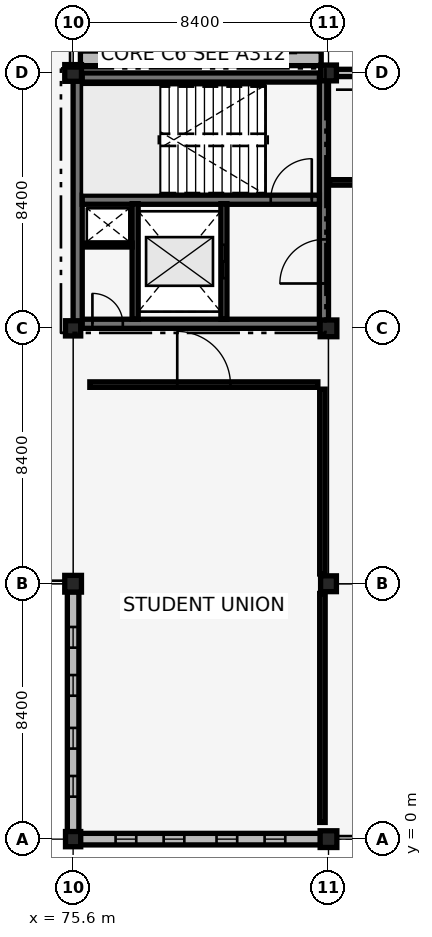
"""IFC4 building model, lengths in metres.
Left out: names, types, materials, properties, quantities, classifications, styles, units other than length and angle.
Written with IfcOpenShell. Run it as: python <this file> out.ifc"""

import sys

from ifc_helpers import new_model, si_unit, direction, frame, frame_2d, origin, origin_2d, place, context, subcontext, project, spatial, rectangle, extrude, element, fill, save


model = new_model("IFC4")
c1 = context("Model", 3, precision=1e-05, world=origin(), true_north=direction((0.0, 1.0)))
c2 = subcontext(c1, "Body", "Model", "MODEL_VIEW")
j1 = project(units=[si_unit("LENGTHUNIT", "METRE"), si_unit("PLANEANGLEUNIT", "RADIAN")], contexts=[c1])
p1 = place(None, origin())
s1 = spatial("IfcSite", under=j1, at=p1, CompositionType="ELEMENT")
p2 = place(p1, origin())
s2 = spatial("IfcBuilding", under=s1, at=p2, CompositionType="ELEMENT")
p3 = place(p2, frame((0.0, 0.0, 5.44)))
s3 = spatial("IfcBuildingStorey", under=s2, at=p3, CompositionType="ELEMENT", Elevation=5.44)
p4 = place(p3, frame((75.75, 16.95, 0.0), z_axis=(0.0, 0.0, 1.0), x_axis=(1.0, 0.0, 0.0)))
e1 = element("IfcWall", 1, at=p4, inside=s3, PredefinedType="SHEAR", context=c2, shape_type="SweptSolid", body=[
    extrude(rectangle(XDim=8.1, YDim=0.3, at=frame_2d((4.05, 0.0))), origin(), (0.0, 0.0, 1.0), 4.12),
])
p5 = place(p4, frame((0.485, 0.0, 0.0)))
e2 = element("IfcOpeningElement", 2, at=p5, cuts=e1, PredefinedType="OPENING", context=c2, shape_type="SweptSolid", body=[
    extrude(rectangle(XDim=1.0, YDim=2.15, at=frame_2d((0.5, 1.075))), frame((0.0, 0.16, 0.0), z_axis=(0.0, -1.0, 0.0), x_axis=(1.0, 0.0, 0.0)), (0.0, 0.0, 1.0), 0.32),
])
for number, where, z_axis, x_axis in (
    (3, (75.75, 25.05, 0.0), (0.0, 0.0, 1.0), (1.0, 0.0, 0.0)),
    (4, (75.75, 16.95, 0.0), (0.0, 0.0, 1.0), (0.0, 1.0, 0.0)),
):
    element("IfcWall", number, at=place(p3, frame(where, z_axis=z_axis, x_axis=x_axis)), inside=s3, PredefinedType="SHEAR", context=c2, shape_type="SweptSolid", body=[
        extrude(rectangle(XDim=8.1, YDim=0.3, at=frame_2d((4.05, 0.0))), origin(), (0.0, 0.0, 1.0), 4.12),
    ])
p6 = place(p3, frame((83.85, 16.95, 0.0), z_axis=(0.0, 0.0, 1.0), x_axis=(0.0, 1.0, 0.0)))
e5 = element("IfcWall", 5, at=p6, inside=s3, PredefinedType="SHEAR", context=c2, shape_type="SweptSolid", body=[
    extrude(rectangle(XDim=8.1, YDim=0.3, at=frame_2d((4.05, 0.0))), origin(), (0.0, 0.0, 1.0), 4.12),
])
p7 = place(p6, frame((1.325, 0.0, 0.0)))
e6 = element("IfcOpeningElement", 6, at=p7, cuts=e5, PredefinedType="OPENING", context=c2, shape_type="SweptSolid", body=[
    extrude(rectangle(XDim=1.45, YDim=2.15, at=frame_2d((0.725, 1.075))), frame((0.0, 0.16, 0.0), z_axis=(0.0, -1.0, 0.0), x_axis=(1.0, 0.0, 0.0)), (0.0, 0.0, 1.0), 0.32),
])
p8 = place(p3, frame((75.9, 21.03, 0.0), z_axis=(0.0, 0.0, 1.0), x_axis=(1.0, 0.0, 0.0)))
e7 = element("IfcWall", 7, at=p8, inside=s3, PredefinedType="SHEAR", context=c2, shape_type="SweptSolid", body=[
    extrude(rectangle(XDim=7.8, YDim=0.3, at=frame_2d((3.9, 0.0))), origin(), (0.0, 0.0, 1.0), 4.12),
])
p9 = place(p8, frame((6.2, 0.0, 0.0)))
e8 = element("IfcOpeningElement", 8, at=p9, cuts=e7, PredefinedType="OPENING", context=c2, shape_type="SweptSolid", body=[
    extrude(rectangle(XDim=1.35, YDim=2.15, at=frame_2d((0.675, 1.075))), frame((0.0, 0.16, 0.0), z_axis=(0.0, -1.0, 0.0), x_axis=(1.0, 0.0, 0.0)), (0.0, 0.0, 1.0), 0.32),
])
p10 = place(p3, frame((75.6, 0.0, 0.0), z_axis=(0.0, 0.0, 1.0), x_axis=(1.0, 0.0, 0.0)))
e9 = element("IfcColumn", 9, at=p10, inside=s3, PredefinedType="COLUMN", context=c2, shape_type="SweptSolid", body=[
    extrude(rectangle(XDim=0.5, YDim=0.5, at=origin_2d()), origin(), (0.0, 0.0, 1.0), 4.12),
])
p11 = place(p3, frame((75.6, 8.4, 0.0), z_axis=(0.0, 0.0, 1.0), x_axis=(1.0, 0.0, 0.0)))
e10 = element("IfcColumn", 10, at=p11, inside=s3, PredefinedType="COLUMN", context=c2, shape_type="SweptSolid", body=[
    extrude(rectangle(XDim=0.55, YDim=0.55, at=origin_2d()), origin(), (0.0, 0.0, 1.0), 4.12),
])
p12 = place(p3, frame((75.6, 16.8, 0.0), z_axis=(0.0, 0.0, 1.0), x_axis=(1.0, 0.0, 0.0)))
e11 = element("IfcColumn", 11, at=p12, inside=s3, PredefinedType="COLUMN", context=c2, shape_type="SweptSolid", body=[
    extrude(rectangle(XDim=0.5, YDim=0.5, at=origin_2d()), origin(), (0.0, 0.0, 1.0), 4.12),
])
for number, where, z_axis, x_axis in (
    (12, (75.6, 25.2, 0.0), (0.0, 0.0, 1.0), (1.0, 0.0, 0.0)),
    (13, (84.0, 0.0, 0.0), (0.0, 0.0, 1.0), (1.0, 0.0, 0.0)),
):
    element("IfcColumn", number, at=place(p3, frame(where, z_axis=z_axis, x_axis=x_axis)), inside=s3, PredefinedType="COLUMN", context=c2, shape_type="SweptSolid", body=[
        extrude(rectangle(XDim=0.55, YDim=0.55, at=origin_2d()), origin(), (0.0, 0.0, 1.0), 4.12),
    ])
p13 = place(p3, frame((84.0, 8.4, 0.0), z_axis=(0.0, 0.0, 1.0), x_axis=(1.0, 0.0, 0.0)))
e14 = element("IfcColumn", 14, at=p13, inside=s3, PredefinedType="COLUMN", context=c2, shape_type="SweptSolid", body=[
    extrude(rectangle(XDim=0.52, YDim=0.52, at=origin_2d()), origin(), (0.0, 0.0, 1.0), 4.12),
])
p14 = place(p3, frame((84.0, 16.8, 0.0), z_axis=(0.0, 0.0, 1.0), x_axis=(1.0, 0.0, 0.0)))
e15 = element("IfcColumn", 15, at=p14, inside=s3, PredefinedType="COLUMN", context=c2, shape_type="SweptSolid", body=[
    extrude(rectangle(XDim=0.55, YDim=0.55, at=origin_2d()), origin(), (0.0, 0.0, 1.0), 4.12),
])
p15 = place(p3, frame((84.0, 25.2, 0.0), z_axis=(0.0, 0.0, 1.0), x_axis=(1.0, 0.0, 0.0)))
e16 = element("IfcColumn", 16, at=p15, inside=s3, PredefinedType="COLUMN", context=c2, shape_type="SweptSolid", body=[
    extrude(rectangle(XDim=0.52, YDim=0.52, at=origin_2d()), origin(), (0.0, 0.0, 1.0), 4.12),
])
p16 = place(p3, frame((75.835, 0.0, 0.0), z_axis=(0.0, 0.0, 1.0), x_axis=(1.0, 0.0, 0.0)))
e17 = element("IfcWall", 17, at=p16, inside=s3, PredefinedType="SOLIDWALL", context=c2, shape_type="SweptSolid", body=[
    extrude(rectangle(XDim=7.905, YDim=0.38, at=frame_2d((3.953, 0.0))), origin(), (0.0, 0.0, 1.0), 3.38),
])
p17 = place(p16, frame((1.162, 0.0, 0.7)))
e18 = element("IfcOpeningElement", 18, at=p17, cuts=e17, PredefinedType="OPENING", context=c2, shape_type="SweptSolid", body=[
    extrude(rectangle(XDim=0.68, YDim=2.3, at=frame_2d((0.34, 1.15))), frame((0.0, 0.2, 0.0), z_axis=(0.0, -1.0, 0.0), x_axis=(1.0, 0.0, 0.0)), (0.0, 0.0, 1.0), 0.4),
])
p18 = place(p16, frame((2.743, 0.0, 0.7)))
e19 = element("IfcOpeningElement", 19, at=p18, cuts=e17, PredefinedType="OPENING", context=c2, shape_type="SweptSolid", body=[
    extrude(rectangle(XDim=0.68, YDim=2.3, at=frame_2d((0.34, 1.15))), frame((0.0, 0.2, 0.0), z_axis=(0.0, -1.0, 0.0), x_axis=(1.0, 0.0, 0.0)), (0.0, 0.0, 1.0), 0.4),
])
p19 = place(p16, frame((4.482, 0.0, 0.7)))
e20 = element("IfcOpeningElement", 20, at=p19, cuts=e17, PredefinedType="OPENING", context=c2, shape_type="SweptSolid", body=[
    extrude(rectangle(XDim=0.68, YDim=2.3, at=frame_2d((0.34, 1.15))), frame((0.0, 0.2, 0.0), z_axis=(0.0, -1.0, 0.0), x_axis=(1.0, 0.0, 0.0)), (0.0, 0.0, 1.0), 0.4),
])
p20 = place(p16, frame((6.063, 0.0, 0.7)))
e21 = element("IfcOpeningElement", 21, at=p20, cuts=e17, PredefinedType="OPENING", context=c2, shape_type="SweptSolid", body=[
    extrude(rectangle(XDim=0.68, YDim=2.3, at=frame_2d((0.34, 1.15))), frame((0.0, 0.2, 0.0), z_axis=(0.0, -1.0, 0.0), x_axis=(1.0, 0.0, 0.0)), (0.0, 0.0, 1.0), 0.4),
])
p21 = place(p3, frame((75.6, 0.235, 0.0), z_axis=(0.0, 0.0, 1.0), x_axis=(0.0, 1.0, 0.0)))
e22 = element("IfcWall", 22, at=p21, inside=s3, PredefinedType="SOLIDWALL", context=c2, shape_type="SweptSolid", body=[
    extrude(rectangle(XDim=7.905, YDim=0.38, at=frame_2d((3.952, 0.0))), origin(), (0.0, 0.0, 1.0), 3.81),
])
p22 = place(p21, frame((1.162, 0.0, 0.75)))
e23 = element("IfcOpeningElement", 23, at=p22, cuts=e22, PredefinedType="OPENING", context=c2, shape_type="SweptSolid", body=[
    extrude(rectangle(XDim=0.68, YDim=2.3, at=frame_2d((0.34, 1.15))), frame((0.0, 0.2, 0.0), z_axis=(0.0, -1.0, 0.0), x_axis=(1.0, 0.0, 0.0)), (0.0, 0.0, 1.0), 0.4),
])
p23 = place(p21, frame((2.743, 0.0, 0.75)))
e24 = element("IfcOpeningElement", 24, at=p23, cuts=e22, PredefinedType="OPENING", context=c2, shape_type="SweptSolid", body=[
    extrude(rectangle(XDim=0.68, YDim=2.3, at=frame_2d((0.34, 1.15))), frame((0.0, 0.2, 0.0), z_axis=(0.0, -1.0, 0.0), x_axis=(1.0, 0.0, 0.0)), (0.0, 0.0, 1.0), 0.4),
])
p24 = place(p21, frame((4.482, 0.0, 0.75)))
e25 = element("IfcOpeningElement", 25, at=p24, cuts=e22, PredefinedType="OPENING", context=c2, shape_type="SweptSolid", body=[
    extrude(rectangle(XDim=0.68, YDim=2.3, at=frame_2d((0.34, 1.15))), frame((0.0, 0.2, 0.0), z_axis=(0.0, -1.0, 0.0), x_axis=(1.0, 0.0, 0.0)), (0.0, 0.0, 1.0), 0.4),
])
p25 = place(p21, frame((6.063, 0.0, 0.75)))
e26 = element("IfcOpeningElement", 26, at=p25, cuts=e22, PredefinedType="OPENING", context=c2, shape_type="SweptSolid", body=[
    extrude(rectangle(XDim=0.68, YDim=2.3, at=frame_2d((0.34, 1.15))), frame((0.0, 0.2, 0.0), z_axis=(0.0, -1.0, 0.0), x_axis=(1.0, 0.0, 0.0)), (0.0, 0.0, 1.0), 0.4),
])
p26 = place(p3, frame((75.84, 25.68, 0.0), z_axis=(0.0, 0.0, 1.0), x_axis=(1.0, 0.0, 0.0)))
e27 = element("IfcWall", 27, at=p26, inside=s3, PredefinedType="SOLIDWALL", context=c2, shape_type="SweptSolid", body=[
    extrude(rectangle(XDim=7.92, YDim=0.48, at=frame_2d((3.96, 0.0))), origin(), (0.0, 0.0, 1.0), 4.42),
])
p27 = place(p3, frame((84.245, 25.2, 0.0), z_axis=(0.0, 0.0, 1.0), x_axis=(1.0, 0.0, 0.0)))
e28 = element("IfcWall", 28, at=p27, inside=s3, PredefinedType="SOLIDWALL", context=c2, shape_type="SweptSolid", body=[
    extrude(rectangle(XDim=7.895, YDim=0.24, at=frame_2d((3.947, 0.0))), origin(), (0.0, 0.0, 1.0), 3.37),
])
p28 = place(p27, frame((0.81, 0.0, 0.35)))
e29 = element("IfcOpeningElement", 29, at=p28, cuts=e28, PredefinedType="OPENING", context=c2, shape_type="SweptSolid", body=[
    extrude(rectangle(XDim=0.44, YDim=1.25, at=frame_2d((0.22, 0.625))), frame((0.0, 0.13, 0.0), z_axis=(0.0, -1.0, 0.0), x_axis=(1.0, 0.0, 0.0)), (0.0, 0.0, 1.0), 0.26),
])
p29 = place(p27, frame((2.269, 0.0, 0.35)))
e30 = element("IfcOpeningElement", 30, at=p29, cuts=e28, PredefinedType="OPENING", context=c2, shape_type="SweptSolid", body=[
    extrude(rectangle(XDim=0.44, YDim=1.25, at=frame_2d((0.22, 0.625))), frame((0.0, 0.13, 0.0), z_axis=(0.0, -1.0, 0.0), x_axis=(1.0, 0.0, 0.0)), (0.0, 0.0, 1.0), 0.26),
])
p30 = place(p27, frame((3.728, 0.0, 0.35)))
e31 = element("IfcOpeningElement", 31, at=p30, cuts=e28, PredefinedType="OPENING", context=c2, shape_type="SweptSolid", body=[
    extrude(rectangle(XDim=0.44, YDim=1.25, at=frame_2d((0.22, 0.625))), frame((0.0, 0.13, 0.0), z_axis=(0.0, -1.0, 0.0), x_axis=(1.0, 0.0, 0.0)), (0.0, 0.0, 1.0), 0.26),
])
p31 = place(p27, frame((5.187, 0.0, 0.35)))
e32 = element("IfcOpeningElement", 32, at=p31, cuts=e28, PredefinedType="OPENING", context=c2, shape_type="SweptSolid", body=[
    extrude(rectangle(XDim=0.44, YDim=1.25, at=frame_2d((0.22, 0.625))), frame((0.0, 0.13, 0.0), z_axis=(0.0, -1.0, 0.0), x_axis=(1.0, 0.0, 0.0)), (0.0, 0.0, 1.0), 0.26),
])
p32 = place(p27, frame((6.646, 0.0, 0.35)))
e33 = element("IfcOpeningElement", 33, at=p32, cuts=e28, PredefinedType="OPENING", context=c2, shape_type="SweptSolid", body=[
    extrude(rectangle(XDim=0.44, YDim=1.25, at=frame_2d((0.22, 0.625))), frame((0.0, 0.13, 0.0), z_axis=(0.0, -1.0, 0.0), x_axis=(1.0, 0.0, 0.0)), (0.0, 0.0, 1.0), 0.26),
])
p33 = place(p27, frame((0.81, 0.0, 1.8)))
e34 = element("IfcOpeningElement", 34, at=p33, cuts=e28, PredefinedType="OPENING", context=c2, shape_type="SweptSolid", body=[
    extrude(rectangle(XDim=0.44, YDim=1.25, at=frame_2d((0.22, 0.625))), frame((0.0, 0.13, 0.0), z_axis=(0.0, -1.0, 0.0), x_axis=(1.0, 0.0, 0.0)), (0.0, 0.0, 1.0), 0.26),
])
p34 = place(p27, frame((2.269, 0.0, 1.8)))
e35 = element("IfcOpeningElement", 35, at=p34, cuts=e28, PredefinedType="OPENING", context=c2, shape_type="SweptSolid", body=[
    extrude(rectangle(XDim=0.44, YDim=1.25, at=frame_2d((0.22, 0.625))), frame((0.0, 0.13, 0.0), z_axis=(0.0, -1.0, 0.0), x_axis=(1.0, 0.0, 0.0)), (0.0, 0.0, 1.0), 0.26),
])
p35 = place(p27, frame((3.728, 0.0, 1.8)))
e36 = element("IfcOpeningElement", 36, at=p35, cuts=e28, PredefinedType="OPENING", context=c2, shape_type="SweptSolid", body=[
    extrude(rectangle(XDim=0.44, YDim=1.25, at=frame_2d((0.22, 0.625))), frame((0.0, 0.13, 0.0), z_axis=(0.0, -1.0, 0.0), x_axis=(1.0, 0.0, 0.0)), (0.0, 0.0, 1.0), 0.26),
])
p36 = place(p27, frame((5.187, 0.0, 1.8)))
e37 = element("IfcOpeningElement", 37, at=p36, cuts=e28, PredefinedType="OPENING", context=c2, shape_type="SweptSolid", body=[
    extrude(rectangle(XDim=0.44, YDim=1.25, at=frame_2d((0.22, 0.625))), frame((0.0, 0.13, 0.0), z_axis=(0.0, -1.0, 0.0), x_axis=(1.0, 0.0, 0.0)), (0.0, 0.0, 1.0), 0.26),
])
p37 = place(p27, frame((6.646, 0.0, 1.8)))
e38 = element("IfcOpeningElement", 38, at=p37, cuts=e28, PredefinedType="OPENING", context=c2, shape_type="SweptSolid", body=[
    extrude(rectangle(XDim=0.44, YDim=1.25, at=frame_2d((0.22, 0.625))), frame((0.0, 0.13, 0.0), z_axis=(0.0, -1.0, 0.0), x_axis=(1.0, 0.0, 0.0)), (0.0, 0.0, 1.0), 0.26),
])
p38 = place(p3, frame((80.56, 17.1, 0.0), z_axis=(0.0, 0.0, 1.0), x_axis=(0.0, 1.0, 0.0)))
e39 = element("IfcWall", 39, at=p38, inside=s3, PredefinedType="SHEAR", context=c2, shape_type="SweptSolid", body=[
    extrude(rectangle(XDim=3.8, YDim=0.2, at=frame_2d((1.9, 0.0))), origin(), (0.0, 0.0, 1.0), 3.34),
])
p39 = place(p38, frame((1.35, 0.0, 0.0)))
e40 = element("IfcOpeningElement", 40, at=p39, cuts=e39, PredefinedType="OPENING", context=c2, shape_type="SweptSolid", body=[
    extrude(rectangle(XDim=1.1, YDim=2.15, at=frame_2d((0.55, 1.075))), frame((0.0, 0.11, 0.0), z_axis=(0.0, -1.0, 0.0), x_axis=(1.0, 0.0, 0.0)), (0.0, 0.0, 1.0), 0.22),
])
p40 = place(p3, frame((77.64, 17.1, 0.0), z_axis=(0.0, 0.0, 1.0), x_axis=(0.0, 1.0, 0.0)))
e41 = element("IfcWall", 41, at=p40, inside=s3, PredefinedType="SHEAR", context=c2, shape_type="SweptSolid", body=[
    extrude(rectangle(XDim=3.8, YDim=0.2, at=frame_2d((1.9, 0.0))), origin(), (0.0, 0.0, 1.0), 3.34),
])
p41 = place(p3, frame((75.92, 19.54, 0.0), z_axis=(0.0, 0.0, 1.0), x_axis=(1.0, 0.0, 0.0)))
e42 = element("IfcWall", 42, at=p41, inside=s3, PredefinedType="PARTITIONING", context=c2, shape_type="SweptSolid", body=[
    extrude(rectangle(XDim=1.62, YDim=0.13, at=frame_2d((0.81, 0.0))), origin(), (0.0, 0.0, 1.0), 4.12),
])
p42 = place(p3, frame((76.15, 14.95, 0.0), z_axis=(0.0, 0.0, 1.0), x_axis=(1.0, 0.0, 0.0)))
e43 = element("IfcWall", 43, at=p42, inside=s3, PredefinedType="PARTITIONING", context=c2, shape_type="SweptSolid", body=[
    extrude(rectangle(XDim=7.5, YDim=0.18, at=frame_2d((3.75, 0.0))), origin(), (0.0, 0.0, 1.0), 4.12),
])
p43 = place(p42, frame((2.875, 0.0, 0.0)))
e44 = element("IfcOpeningElement", 44, at=p43, cuts=e43, PredefinedType="OPENING", context=c2, shape_type="SweptSolid", body=[
    extrude(rectangle(XDim=1.75, YDim=2.3, at=frame_2d((0.875, 1.15))), frame((0.0, 0.1, 0.0), z_axis=(0.0, -1.0, 0.0), x_axis=(1.0, 0.0, 0.0)), (0.0, 0.0, 1.0), 0.2),
])
p44 = place(p3, frame((83.8, 0.55, 0.0), z_axis=(0.0, 0.0, 1.0), x_axis=(0.0, 1.0, 0.0)))
e45 = element("IfcWall", 45, at=p44, inside=s3, PredefinedType="PARTITIONING", context=c2, shape_type="SweptSolid", body=[
    extrude(rectangle(XDim=7.53, YDim=0.18, at=frame_2d((3.765, 0.0))), origin(), (0.0, 0.0, 1.0), 3.47),
])
p45 = place(p3, frame((83.8, 8.72, 0.0), z_axis=(0.0, 0.0, 1.0), x_axis=(0.0, 1.0, 0.0)))
e46 = element("IfcWall", 46, at=p45, inside=s3, PredefinedType="PARTITIONING", context=c2, shape_type="SweptSolid", body=[
    extrude(rectangle(XDim=6.08, YDim=0.18, at=frame_2d((3.04, 0.0))), origin(), (0.0, 0.0, 1.0), 3.47),
])
p46 = place(p3, frame((84.03, 21.6, 0.0), z_axis=(0.0, 0.0, 1.0), x_axis=(1.0, 0.0, 0.0)))
e47 = element("IfcWall", 47, at=p46, inside=s3, PredefinedType="PARTITIONING", context=c2, shape_type="SweptSolid", body=[
    extrude(rectangle(XDim=20.62, YDim=0.18, at=frame_2d((10.31, 0.0))), origin(), (0.0, 0.0, 1.0), 3.47),
])
p47 = place(p46, frame((9.435, 0.0, 0.0)))
e48 = element("IfcOpeningElement", 48, at=p47, cuts=e47, PredefinedType="OPENING", context=c2, shape_type="SweptSolid", body=[
    extrude(rectangle(XDim=1.75, YDim=2.3, at=frame_2d((0.875, 1.15))), frame((0.0, 0.1, 0.0), z_axis=(0.0, -1.0, 0.0), x_axis=(1.0, 0.0, 0.0)), (0.0, 0.0, 1.0), 0.2),
])
p48 = place(p17, origin())
e49 = element("IfcWindow", 49, at=p48, inside=s3, PartitioningType="DOUBLE_PANEL_VERTICAL", PredefinedType="WINDOW", context=c2, shape_type="SweptSolid", body=[
    extrude(rectangle(XDim=0.68, YDim=2.3, at=frame_2d((0.34, 1.15))), frame((0.0, 0.03, 0.0), z_axis=(0.0, -1.0, 0.0), x_axis=(1.0, 0.0, 0.0)), (0.0, 0.0, 1.0), 0.06),
])
fill(e18, e49)
p49 = place(p18, origin())
e50 = element("IfcWindow", 50, at=p49, inside=s3, PartitioningType="DOUBLE_PANEL_VERTICAL", PredefinedType="WINDOW", context=c2, shape_type="SweptSolid", body=[
    extrude(rectangle(XDim=0.68, YDim=2.3, at=frame_2d((0.34, 1.15))), frame((0.0, 0.03, 0.0), z_axis=(0.0, -1.0, 0.0), x_axis=(1.0, 0.0, 0.0)), (0.0, 0.0, 1.0), 0.06),
])
fill(e19, e50)
p50 = place(p19, origin())
e51 = element("IfcWindow", 51, at=p50, inside=s3, PartitioningType="DOUBLE_PANEL_VERTICAL", PredefinedType="WINDOW", context=c2, shape_type="SweptSolid", body=[
    extrude(rectangle(XDim=0.68, YDim=2.3, at=frame_2d((0.34, 1.15))), frame((0.0, 0.03, 0.0), z_axis=(0.0, -1.0, 0.0), x_axis=(1.0, 0.0, 0.0)), (0.0, 0.0, 1.0), 0.06),
])
fill(e20, e51)
p51 = place(p20, origin())
e52 = element("IfcWindow", 52, at=p51, inside=s3, PartitioningType="DOUBLE_PANEL_VERTICAL", PredefinedType="WINDOW", context=c2, shape_type="SweptSolid", body=[
    extrude(rectangle(XDim=0.68, YDim=2.3, at=frame_2d((0.34, 1.15))), frame((0.0, 0.03, 0.0), z_axis=(0.0, -1.0, 0.0), x_axis=(1.0, 0.0, 0.0)), (0.0, 0.0, 1.0), 0.06),
])
fill(e21, e52)
p52 = place(p22, origin())
e53 = element("IfcWindow", 53, at=p52, inside=s3, PartitioningType="DOUBLE_PANEL_VERTICAL", PredefinedType="WINDOW", context=c2, shape_type="SweptSolid", body=[
    extrude(rectangle(XDim=0.68, YDim=2.3, at=frame_2d((0.34, 1.15))), frame((0.0, 0.03, 0.0), z_axis=(0.0, -1.0, 0.0), x_axis=(1.0, 0.0, 0.0)), (0.0, 0.0, 1.0), 0.06),
])
fill(e23, e53)
p53 = place(p23, origin())
e54 = element("IfcWindow", 54, at=p53, inside=s3, PartitioningType="DOUBLE_PANEL_VERTICAL", PredefinedType="WINDOW", context=c2, shape_type="SweptSolid", body=[
    extrude(rectangle(XDim=0.68, YDim=2.3, at=frame_2d((0.34, 1.15))), frame((0.0, 0.03, 0.0), z_axis=(0.0, -1.0, 0.0), x_axis=(1.0, 0.0, 0.0)), (0.0, 0.0, 1.0), 0.06),
])
fill(e24, e54)
p54 = place(p24, origin())
e55 = element("IfcWindow", 55, at=p54, inside=s3, PartitioningType="DOUBLE_PANEL_VERTICAL", PredefinedType="WINDOW", context=c2, shape_type="SweptSolid", body=[
    extrude(rectangle(XDim=0.68, YDim=2.3, at=frame_2d((0.34, 1.15))), frame((0.0, 0.03, 0.0), z_axis=(0.0, -1.0, 0.0), x_axis=(1.0, 0.0, 0.0)), (0.0, 0.0, 1.0), 0.06),
])
fill(e25, e55)
p55 = place(p25, origin())
e56 = element("IfcWindow", 56, at=p55, inside=s3, PartitioningType="DOUBLE_PANEL_VERTICAL", PredefinedType="WINDOW", context=c2, shape_type="SweptSolid", body=[
    extrude(rectangle(XDim=0.68, YDim=2.3, at=frame_2d((0.34, 1.15))), frame((0.0, 0.03, 0.0), z_axis=(0.0, -1.0, 0.0), x_axis=(1.0, 0.0, 0.0)), (0.0, 0.0, 1.0), 0.06),
])
fill(e26, e56)
p56 = place(p9, origin())
e57 = element("IfcDoor", 57, at=p56, inside=s3, OperationType="SINGLE_SWING_RIGHT", PredefinedType="DOOR", context=c2, shape_type="SweptSolid", body=[
    extrude(rectangle(XDim=1.35, YDim=2.15, at=frame_2d((0.675, 1.075))), frame((0.0, 0.025, 0.0), z_axis=(0.0, -1.0, 0.0), x_axis=(1.0, 0.0, 0.0)), (0.0, 0.0, 1.0), 0.05),
])
fill(e8, e57)
p57 = place(p39, origin())
e58 = element("IfcDoor", 58, at=p57, inside=s3, OperationType="SLIDING_TO_LEFT", PredefinedType="DOOR", context=c2, shape_type="SweptSolid", body=[
    extrude(rectangle(XDim=1.1, YDim=2.15, at=frame_2d((0.55, 1.075))), frame((0.0, 0.025, 0.0), z_axis=(0.0, -1.0, 0.0), x_axis=(1.0, 0.0, 0.0)), (0.0, 0.0, 1.0), 0.05),
])
fill(e40, e58)
p58 = place(p7, origin())
e59 = element("IfcDoor", 59, at=p58, inside=s3, OperationType="DOUBLE_DOOR_SINGLE_SWING", PredefinedType="DOOR", context=c2, shape_type="SweptSolid", body=[
    extrude(rectangle(XDim=1.45, YDim=2.15, at=frame_2d((0.725, 1.075))), frame((0.0, 0.025, 0.0), z_axis=(0.0, -1.0, 0.0), x_axis=(1.0, 0.0, 0.0)), (0.0, 0.0, 1.0), 0.05),
])
fill(e6, e59)
p59 = place(p5, origin())
e60 = element("IfcDoor", 60, at=p59, inside=s3, OperationType="SINGLE_SWING_LEFT", PredefinedType="DOOR", context=c2, shape_type="SweptSolid", body=[
    extrude(rectangle(XDim=1.0, YDim=2.15, at=frame_2d((0.5, 1.075))), frame((0.0, 0.025, 0.0), z_axis=(0.0, -1.0, 0.0), x_axis=(1.0, 0.0, 0.0)), (0.0, 0.0, 1.0), 0.05),
])
fill(e2, e60)
p60 = place(p43, origin())
e61 = element("IfcDoor", 61, at=p60, inside=s3, OperationType="DOUBLE_DOOR_SINGLE_SWING", PredefinedType="DOOR", context=c2, shape_type="SweptSolid", body=[
    extrude(rectangle(XDim=1.75, YDim=2.3, at=frame_2d((0.875, 1.15))), frame((0.0, 0.025, 0.0), z_axis=(0.0, -1.0, 0.0), x_axis=(1.0, 0.0, 0.0)), (0.0, 0.0, 1.0), 0.05),
])
fill(e44, e61)
save(model, sys.argv[1])
